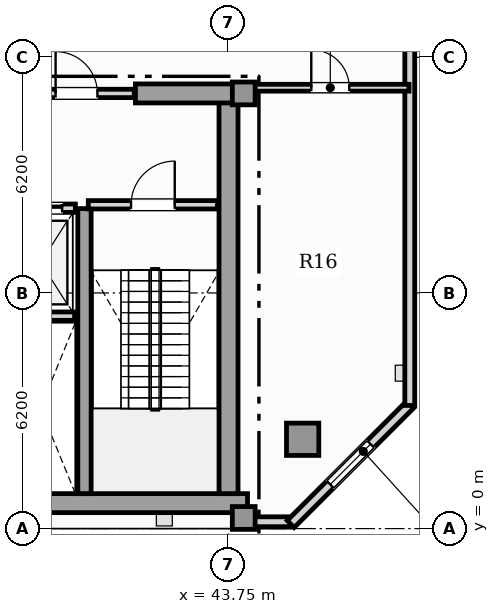
"""IFC4 building model, lengths in metres.
Left out: names, types, materials, properties, quantities, classifications, styles, units other than length and angle.
Written with IfcOpenShell. Run it as: python <this file> out.ifc"""

import sys

from ifc_helpers import new_model, si_unit, direction, frame, frame_2d, origin, origin_2d, place, context, subcontext, project, spatial, rectangle, hollow_rectangle, extrude, element, fill, save


model = new_model("IFC4")
c1 = context("Model", 3, precision=1e-05, world=origin(), true_north=direction((0.0, 1.0)))
c2 = subcontext(c1, "Body", "Model", "MODEL_VIEW")
j1 = project(units=[si_unit("LENGTHUNIT", "METRE"), si_unit("PLANEANGLEUNIT", "RADIAN")], contexts=[c1])
p1 = place(None, origin())
s1 = spatial("IfcSite", under=j1, at=p1, CompositionType="ELEMENT")
p2 = place(p1, origin())
s2 = spatial("IfcBuilding", under=s1, at=p2, CompositionType="ELEMENT")
p3 = place(p2, frame((0.0, 0.0, 308.0)))
s3 = spatial("IfcBuildingStorey", under=s2, at=p3, CompositionType="ELEMENT", Elevation=308.0)
p4 = place(p3, frame((13.25, 0.67, 0.0), z_axis=(0.0, 0.0, 1.0), x_axis=(1.0, 0.0, 0.0)))
e1 = element("IfcWall", 1, at=p4, inside=s3, PredefinedType="SHEAR", context=c2, shape_type="SweptSolid", body=[
    extrude(rectangle(XDim=31.0, YDim=0.5, at=frame_2d((15.5, 0.0))), origin(), (0.0, 0.0, 1.0), 4.85),
])
p5 = place(p3, frame((43.75, 0.92, 0.0), z_axis=(0.0, 0.0, 1.0), x_axis=(0.0, 1.0, 0.0)))
e2 = element("IfcWall", 2, at=p5, inside=s3, PredefinedType="SHEAR", context=c2, shape_type="SweptSolid", body=[
    extrude(rectangle(XDim=10.53, YDim=0.5, at=frame_2d((5.265, 0.0))), origin(), (0.0, 0.0, 1.0), 4.85),
])
p6 = place(p3, frame((41.3, 11.45, 0.0), z_axis=(0.0, 0.0, 1.0), x_axis=(1.0, 0.0, 0.0)))
e3 = element("IfcWall", 3, at=p6, inside=s3, PredefinedType="SHEAR", context=c2, shape_type="SweptSolid", body=[
    extrude(rectangle(XDim=2.95, YDim=0.5, at=frame_2d((1.475, 0.0))), origin(), (0.0, 0.0, 1.0), 4.85),
])
p7 = place(p3, frame((39.96, 0.92, 0.0), z_axis=(0.0, 0.0, 1.0), x_axis=(0.0, 1.0, 0.0)))
e4 = element("IfcWall", 4, at=p7, inside=s3, PredefinedType="SHEAR", context=c2, shape_type="SweptSolid", body=[
    extrude(rectangle(XDim=7.5, YDim=0.35, at=frame_2d((3.75, 0.0))), origin(), (0.0, 0.0, 1.0), 4.85),
])
for number, where, z_axis, x_axis in (
    (5, (44.15, 0.28, 0.0), (0.0, 0.0, 1.0), (1.0, 0.0, 0.0)),
    (6, (44.15, 11.45, 0.0), (0.0, 0.0, 1.0), (1.0, 0.0, 0.0)),
):
    element("IfcColumn", number, at=place(p3, frame(where, z_axis=z_axis, x_axis=x_axis)), inside=s3, PredefinedType="COLUMN", context=c2, shape_type="SweptSolid", body=[
        extrude(rectangle(XDim=0.6, YDim=0.6, at=origin_2d()), origin(), (0.0, 0.0, 1.0), 5.05),
    ])
p8 = place(p3, frame((45.7, 2.35, 0.0), z_axis=(0.0, 0.0, 1.0), x_axis=(1.0, 0.0, 0.0)))
e7 = element("IfcColumn", 7, at=p8, inside=s3, PredefinedType="USERDEFINED", context=c2, shape_type="SweptSolid", body=[
    extrude(hollow_rectangle(XDim=0.85, YDim=0.85, WallThickness=0.05, at=origin_2d()), origin(), (0.0, 0.0, 1.0), 5.05),
])
p9 = place(p3, frame((44.25, 0.18, 0.0), z_axis=(0.0, 0.0, 1.0), x_axis=(1.0, 0.0, 0.0)))
e8 = element("IfcWall", 8, at=p9, inside=s3, PredefinedType="SOLIDWALL", context=c2, shape_type="SweptSolid", body=[
    extrude(rectangle(XDim=1.159, YDim=0.26, at=frame_2d((0.58, 0.0))), origin(), (0.0, 0.0, 1.0), 4.85),
])
p10 = place(p3, frame((45.385, 0.12, 0.0), z_axis=(0.0, 0.0, 1.0), x_axis=(0.707106781187, 0.707106781187, 0.0)))
e9 = element("IfcWall", 9, at=p10, inside=s3, PredefinedType="SOLIDWALL", context=c2, shape_type="SweptSolid", body=[
    extrude(rectangle(XDim=4.446, YDim=0.26, at=frame_2d((2.223, 0.0))), origin(), (0.0, 0.0, 1.0), 4.85),
])
p11 = place(p10, frame((1.473, 0.0, 0.9)))
e10 = element("IfcOpeningElement", 10, at=p11, cuts=e9, PredefinedType="OPENING", context=c2, shape_type="SweptSolid", body=[
    extrude(rectangle(XDim=1.5, YDim=1.95, at=frame_2d((0.75, 0.975))), frame((0.0, 0.14, 0.0), z_axis=(0.0, -1.0, 0.0), x_axis=(1.0, 0.0, 0.0)), (0.0, 0.0, 1.0), 0.28),
])
p12 = place(p3, frame((48.519, 3.24, 0.0), z_axis=(0.0, 0.0, 1.0), x_axis=(0.0, 1.0, 0.0)))
e11 = element("IfcWall", 11, at=p12, inside=s3, PredefinedType="SOLIDWALL", context=c2, shape_type="SweptSolid", body=[
    extrude(rectangle(XDim=26.813, YDim=0.26, at=frame_2d((13.406, 0.0))), origin(), (0.0, 0.0, 1.0), 4.85),
])
p13 = place(p12, frame((24.06, 0.0, 0.95)))
e12 = element("IfcOpeningElement", 12, at=p13, cuts=e11, PredefinedType="OPENING", context=c2, shape_type="SweptSolid", body=[
    extrude(rectangle(XDim=0.9, YDim=1.5, at=frame_2d((0.45, 0.75))), frame((0.0, 0.14, 0.0), z_axis=(0.0, -1.0, 0.0), x_axis=(1.0, 0.0, 0.0)), (0.0, 0.0, 1.0), 0.28),
])
p14 = place(p12, frame((10.445, 0.0, 0.9)))
e13 = element("IfcOpeningElement", 13, at=p14, cuts=e11, PredefinedType="OPENING", context=c2, shape_type="SweptSolid", body=[
    extrude(rectangle(XDim=1.5, YDim=1.95, at=frame_2d((0.75, 0.975))), frame((0.0, 0.14, 0.0), z_axis=(0.0, -1.0, 0.0), x_axis=(1.0, 0.0, 0.0)), (0.0, 0.0, 1.0), 0.28),
])
p15 = place(p12, frame((17.51, 0.0, 0.9)))
e14 = element("IfcOpeningElement", 14, at=p15, cuts=e11, PredefinedType="OPENING", context=c2, shape_type="SweptSolid", body=[
    extrude(rectangle(XDim=1.5, YDim=1.95, at=frame_2d((0.75, 0.975))), frame((0.0, 0.14, 0.0), z_axis=(0.0, -1.0, 0.0), x_axis=(1.0, 0.0, 0.0)), (0.0, 0.0, 1.0), 0.28),
])
p16 = place(p3, frame((37.92, 5.59, 0.0), z_axis=(0.0, 0.0, 1.0), x_axis=(1.0, 0.0, 0.0)))
e15 = element("IfcWall", 15, at=p16, inside=s3, PredefinedType="SOLIDWALL", context=c2, shape_type="SweptSolid", body=[
    extrude(rectangle(XDim=1.78, YDim=0.22, at=frame_2d((0.89, 0.0))), origin(), (0.0, 0.0, 1.0), 4.85),
])
p17 = place(p3, frame((37.9, 8.43, 0.0), z_axis=(0.0, 0.0, 1.0), x_axis=(1.0, 0.0, 0.0)))
e16 = element("IfcWall", 16, at=p17, inside=s3, PredefinedType="SOLIDWALL", context=c2, shape_type="SweptSolid", body=[
    extrude(rectangle(XDim=1.82, YDim=0.22, at=frame_2d((0.91, 0.0))), origin(), (0.0, 0.0, 1.0), 4.85),
])
p18 = place(p17, frame((0.35, 0.0, 0.0)))
e17 = element("IfcOpeningElement", 17, at=p18, cuts=e16, PredefinedType="OPENING", context=c2, shape_type="SweptSolid", body=[
    extrude(rectangle(XDim=1.12, YDim=2.25, at=frame_2d((0.56, 1.125))), frame((0.0, 0.12, 0.0), z_axis=(0.0, -1.0, 0.0), x_axis=(1.0, 0.0, 0.0)), (0.0, 0.0, 1.0), 0.24),
])
p19 = place(p3, frame((40.06, 8.52, 0.0), z_axis=(0.0, 0.0, 1.0), x_axis=(1.0, 0.0, 0.0)))
e18 = element("IfcWall", 18, at=p19, inside=s3, PredefinedType="SOLIDWALL", context=c2, shape_type="SweptSolid", body=[
    extrude(rectangle(XDim=3.4, YDim=0.22, at=frame_2d((1.7, 0.0))), origin(), (0.0, 0.0, 1.0), 4.85),
])
p20 = place(p19, frame((1.125, 0.0, 0.0)))
e19 = element("IfcOpeningElement", 19, at=p20, cuts=e18, PredefinedType="OPENING", context=c2, shape_type="SweptSolid", body=[
    extrude(rectangle(XDim=1.15, YDim=2.2, at=frame_2d((0.575, 1.1))), frame((0.0, 0.12, 0.0), z_axis=(0.0, -1.0, 0.0), x_axis=(1.0, 0.0, 0.0)), (0.0, 0.0, 1.0), 0.24),
])
p21 = place(p3, frame((38.23, 11.45, 0.0), z_axis=(0.0, 0.0, 1.0), x_axis=(1.0, 0.0, 0.0)))
e20 = element("IfcWall", 20, at=p21, inside=s3, PredefinedType="SOLIDWALL", context=c2, shape_type="SweptSolid", body=[
    extrude(rectangle(XDim=3.04, YDim=0.22, at=frame_2d((1.52, 0.0))), origin(), (0.0, 0.0, 1.0), 4.85),
])
p22 = place(p21, frame((0.97, 0.0, 0.0)))
e21 = element("IfcOpeningElement", 21, at=p22, cuts=e20, PredefinedType="OPENING", context=c2, shape_type="SweptSolid", body=[
    extrude(rectangle(XDim=1.1, YDim=2.2, at=frame_2d((0.55, 1.1))), frame((0.0, 0.12, 0.0), z_axis=(0.0, -1.0, 0.0), x_axis=(1.0, 0.0, 0.0)), (0.0, 0.0, 1.0), 0.24),
])
p23 = place(p3, frame((44.355, 11.6, 0.0), z_axis=(0.0, 0.0, 1.0), x_axis=(1.0, 0.0, 0.0)))
e22 = element("IfcWall", 22, at=p23, inside=s3, PredefinedType="PARTITIONING", context=c2, shape_type="SweptSolid", body=[
    extrude(rectangle(XDim=4.145, YDim=0.18, at=frame_2d((2.072, 0.0))), origin(), (0.0, 0.0, 1.0), 4.85),
])
p24 = place(p23, frame((1.573, 0.0, 0.0)))
e23 = element("IfcOpeningElement", 23, at=p24, cuts=e22, PredefinedType="OPENING", context=c2, shape_type="SweptSolid", body=[
    extrude(rectangle(XDim=1.0, YDim=2.15, at=frame_2d((0.5, 1.075))), frame((0.0, 0.1, 0.0), z_axis=(0.0, -1.0, 0.0), x_axis=(1.0, 0.0, 0.0)), (0.0, 0.0, 1.0), 0.2),
])
p25 = place(p11, origin())
e24 = element("IfcWindow", 24, at=p25, inside=s3, PartitioningType="SINGLE_PANEL", PredefinedType="WINDOW", context=c2, shape_type="SweptSolid", body=[
    extrude(rectangle(XDim=1.5, YDim=1.95, at=frame_2d((0.75, 0.975))), frame((0.0, 0.03, 0.0), z_axis=(0.0, -1.0, 0.0), x_axis=(1.0, 0.0, 0.0)), (0.0, 0.0, 1.0), 0.06),
])
fill(e10, e24)
p26 = place(p18, origin())
e25 = element("IfcDoor", 25, at=p26, inside=s3, OperationType="SLIDING_TO_LEFT", PredefinedType="DOOR", context=c2, shape_type="SweptSolid", body=[
    extrude(rectangle(XDim=1.12, YDim=2.25, at=frame_2d((0.56, 1.125))), frame((0.0, 0.025, 0.0), z_axis=(0.0, -1.0, 0.0), x_axis=(1.0, 0.0, 0.0)), (0.0, 0.0, 1.0), 0.05),
])
fill(e17, e25)
p27 = place(p20, origin())
e26 = element("IfcDoor", 26, at=p27, inside=s3, OperationType="SINGLE_SWING_RIGHT", PredefinedType="DOOR", context=c2, shape_type="SweptSolid", body=[
    extrude(rectangle(XDim=1.15, YDim=2.2, at=frame_2d((0.575, 1.1))), frame((0.0, 0.025, 0.0), z_axis=(0.0, -1.0, 0.0), x_axis=(1.0, 0.0, 0.0)), (0.0, 0.0, 1.0), 0.05),
])
fill(e19, e26)
p28 = place(p22, origin())
e27 = element("IfcDoor", 27, at=p28, inside=s3, OperationType="SINGLE_SWING_LEFT", PredefinedType="DOOR", context=c2, shape_type="SweptSolid", body=[
    extrude(rectangle(XDim=1.1, YDim=2.2, at=frame_2d((0.55, 1.1))), frame((0.0, 0.025, 0.0), z_axis=(0.0, -1.0, 0.0), x_axis=(1.0, 0.0, 0.0)), (0.0, 0.0, 1.0), 0.05),
])
fill(e21, e27)
p29 = place(p24, origin())
e28 = element("IfcDoor", 28, at=p29, inside=s3, OperationType="SINGLE_SWING_LEFT", PredefinedType="DOOR", context=c2, shape_type="SweptSolid", body=[
    extrude(rectangle(XDim=1.0, YDim=2.15, at=frame_2d((0.5, 1.075))), frame((0.0, 0.025, 0.0), z_axis=(0.0, -1.0, 0.0), x_axis=(1.0, 0.0, 0.0)), (0.0, 0.0, 1.0), 0.05),
])
fill(e23, e28)
save(model, sys.argv[1])
